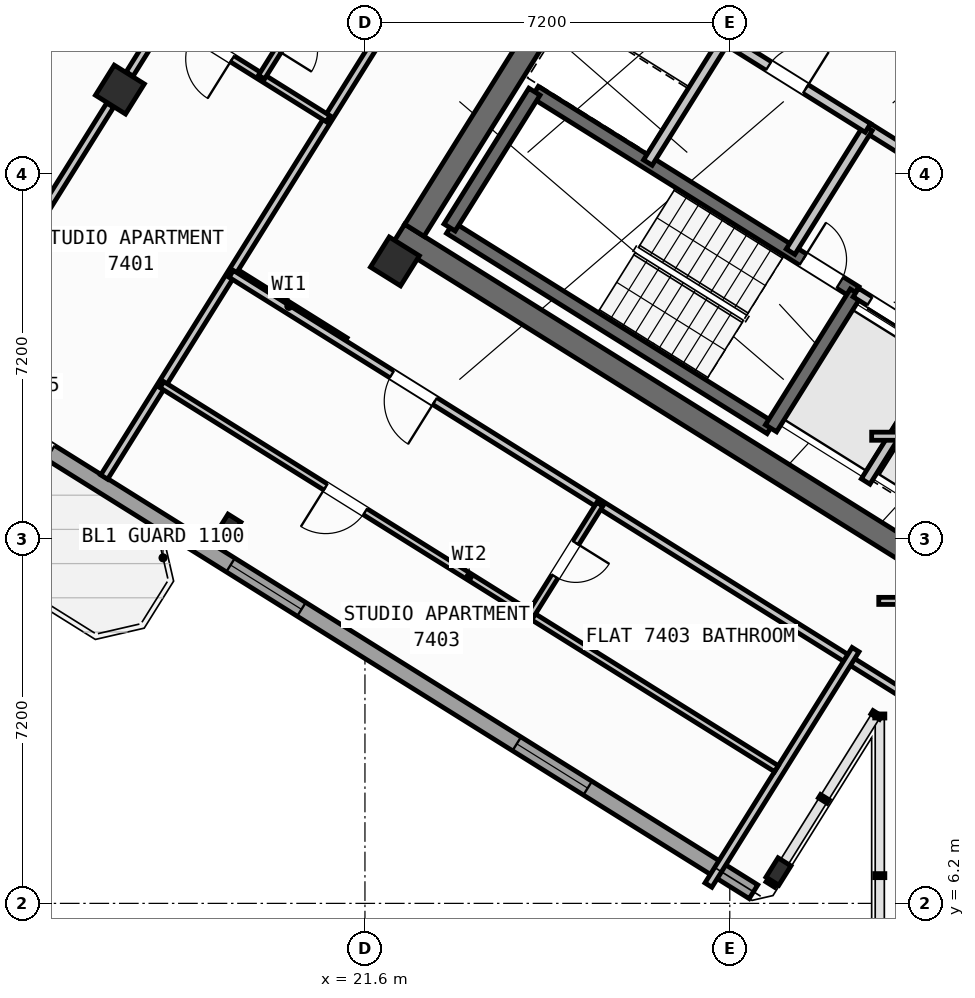
"""IFC4 building model, lengths in metres.
Left out: names, types, materials, properties, quantities, classifications, styles, units other than length and angle.
Written with IfcOpenShell. Run it as: python <this file> out.ifc"""

import sys

from ifc_helpers import new_model, si_unit, direction, frame, frame_2d, origin, origin_2d, place, context, subcontext, project, spatial, rectangle, hollow_rectangle, i_section, extrude, source, transform, mapped, element, fill, save


model = new_model("IFC4")
c1 = context("Model", 3, precision=1e-05, world=origin(), true_north=direction((0.0, 1.0)))
c2 = subcontext(c1, "Body", "Model", "MODEL_VIEW")
j1 = project(units=[si_unit("LENGTHUNIT", "METRE"), si_unit("PLANEANGLEUNIT", "RADIAN")], contexts=[c1])
p1 = place(None, origin())
s1 = spatial("IfcSite", under=j1, at=p1, CompositionType="ELEMENT")
p2 = place(p1, origin())
s2 = spatial("IfcBuilding", under=s1, at=p2, CompositionType="ELEMENT")
p3 = place(p2, frame((0.0, 0.0, 291.6)))
s3 = spatial("IfcBuildingStorey", under=s2, at=p3, CompositionType="ELEMENT", Elevation=291.6)
p4 = place(p3, frame((33.324, 12.503, 0.0), z_axis=(0.0, 0.0, 1.0), x_axis=(-0.848043529849, 0.529926571782, 0.0)))
e1 = element("IfcWall", 1, at=p4, inside=s3, PredefinedType="SHEAR", context=c2, shape_type="SweptSolid", body=[
    extrude(rectangle(XDim=13.04, YDim=0.45, at=frame_2d((6.52, 0.0))), origin(), (0.0, 0.0, 1.0), 3.35),
])
p5 = place(p3, frame((26.007, 24.976, 0.0), z_axis=(0.0, 0.0, 1.0), x_axis=(-0.529931155655, -0.848040665456, 0.0)))
e2 = element("IfcWall", 2, at=p5, inside=s3, PredefinedType="SHEAR", context=c2, shape_type="SweptSolid", body=[
    extrude(rectangle(XDim=6.475, YDim=0.45, at=frame_2d((3.238, 0.0))), origin(), (0.0, 0.0, 1.0), 3.35),
])
m1 = source(origin(), c2, "Body", "SweptSolid", [
    extrude(i_section(OverallWidth=0.3, OverallDepth=0.45, WebThickness=0.014, FlangeThickness=0.026, at=origin_2d()), origin(), (0.0, 0.0, 1.0), 3.6),
])
p6 = place(p3, frame((29.761, 6.829, 0.0), z_axis=(0.0, 0.0, 1.0), x_axis=(-0.848048096156, 0.529919264233, 0.0)))
e3 = element("IfcColumn", 3, at=p6, inside=s3, PredefinedType="COLUMN", context=c2, shape_type="MappedRepresentation", body=[
    mapped(m1, transform((0.0, 0.0, 0.0), scale=1.0)),
])
m2 = source(origin(), c2, "Body", "SweptSolid", [
    extrude(hollow_rectangle(XDim=0.7, YDim=0.7, WallThickness=0.028, at=origin_2d()), origin(), (0.0, 0.0, 1.0), 3.6),
])
p7 = place(p3, frame((22.191, 18.87, 0.0), z_axis=(0.0, 0.0, 1.0), x_axis=(-0.848048096156, 0.529919264233, 0.0)))
e4 = element("IfcColumn", 4, at=p7, inside=s3, PredefinedType="COLUMN", context=c2, shape_type="MappedRepresentation", body=[
    mapped(m2, transform((0.0, 0.0, 0.0), scale=1.0)),
])
p8 = place(p3, frame((18.906, 13.612, 0.0), z_axis=(0.0, 0.0, 1.0), x_axis=(-0.848048096156, 0.529919264233, 0.0)))
e5 = element("IfcColumn", 5, at=p8, inside=s3, PredefinedType="COLUMN", context=c2, shape_type="MappedRepresentation", body=[
    mapped(m1, transform((0.0, 0.0, 0.0), scale=1.0)),
])
p9 = place(p3, frame((16.764, 22.261, 0.0), z_axis=(0.0, 0.0, 1.0), x_axis=(-0.848048096156, 0.529919264233, 0.0)))
e6 = element("IfcColumn", 6, at=p9, inside=s3, PredefinedType="COLUMN", context=c2, shape_type="MappedRepresentation", body=[
    mapped(m2, transform((0.0, 0.0, 0.0), scale=1.0)),
])
p10 = place(p3, frame((29.268, 6.429, 0.0), z_axis=(0.0, 0.0, 1.0), x_axis=(-0.848048398186, 0.529918780885, 0.0)))
e7 = element("IfcWall", 7, at=p10, inside=s3, PredefinedType="STANDARD", context=c2, shape_type="SweptSolid", body=[
    extrude(rectangle(XDim=25.188, YDim=0.32, at=frame_2d((12.594, 0.0))), origin(), (0.0, 0.0, 1.0), 3.35),
])
p11 = place(p10, frame((16.362, 0.0, 0.0)))
e8 = element("IfcOpeningElement", 8, at=p11, cuts=e7, PredefinedType="OPENING", context=c2, shape_type="SweptSolid", body=[
    extrude(rectangle(XDim=1.2, YDim=2.15, at=frame_2d((0.6, 1.075))), frame((0.0, 0.17, 0.0), z_axis=(0.0, -1.0, 0.0), x_axis=(1.0, 0.0, 0.0)), (0.0, 0.0, 1.0), 0.34),
])
p12 = place(p10, frame((3.859, 0.0, 0.9)))
e9 = element("IfcOpeningElement", 9, at=p12, cuts=e7, PredefinedType="OPENING", context=c2, shape_type="SweptSolid", body=[
    extrude(rectangle(XDim=1.65, YDim=1.45, at=frame_2d((0.825, 0.725))), frame((0.0, 0.17, 0.0), z_axis=(0.0, -1.0, 0.0), x_axis=(1.0, 0.0, 0.0)), (0.0, 0.0, 1.0), 0.34),
])
p13 = place(p10, frame((10.519, 0.0, 0.9)))
e10 = element("IfcOpeningElement", 10, at=p13, cuts=e7, PredefinedType="OPENING", context=c2, shape_type="SweptSolid", body=[
    extrude(rectangle(XDim=1.65, YDim=1.45, at=frame_2d((0.825, 0.725))), frame((0.0, 0.17, 0.0), z_axis=(0.0, -1.0, 0.0), x_axis=(1.0, 0.0, 0.0)), (0.0, 0.0, 1.0), 0.34),
])
p14 = place(p10, frame((21.156, 0.0, 0.95)))
e11 = element("IfcOpeningElement", 11, at=p14, cuts=e7, PredefinedType="OPENING", context=c2, shape_type="SweptSolid", body=[
    extrude(rectangle(XDim=1.95, YDim=1.35, at=frame_2d((0.975, 0.675))), frame((0.0, 0.17, 0.0), z_axis=(0.0, -1.0, 0.0), x_axis=(1.0, 0.0, 0.0)), (0.0, 0.0, 1.0), 0.34),
])
p15 = place(p3, frame((7.842, 20.061, 0.0), z_axis=(0.0, 0.0, 1.0), x_axis=(0.529915577903, 0.84805039962, 0.0)))
e12 = element("IfcWall", 12, at=p15, inside=s3, PredefinedType="STANDARD", context=c2, shape_type="SweptSolid", body=[
    extrude(rectangle(XDim=21.587, YDim=0.32, at=frame_2d((10.794, 0.0))), origin(), (0.0, 0.0, 1.0), 2.875),
])
p16 = place(p15, frame((1.368, 0.0, 0.9)))
e13 = element("IfcOpeningElement", 13, at=p16, cuts=e12, PredefinedType="OPENING", context=c2, shape_type="SweptSolid", body=[
    extrude(rectangle(XDim=1.65, YDim=1.45, at=frame_2d((0.825, 0.725))), frame((0.0, 0.17, 0.0), z_axis=(0.0, -1.0, 0.0), x_axis=(1.0, 0.0, 0.0)), (0.0, 0.0, 1.0), 0.34),
])
p17 = place(p15, frame((4.71, 0.0, 1.0)))
e14 = element("IfcOpeningElement", 14, at=p17, cuts=e12, PredefinedType="OPENING", context=c2, shape_type="SweptSolid", body=[
    extrude(rectangle(XDim=0.9, YDim=1.25, at=frame_2d((0.45, 0.625))), frame((0.0, 0.17, 0.0), z_axis=(0.0, -1.0, 0.0), x_axis=(1.0, 0.0, 0.0)), (0.0, 0.0, 1.0), 0.34),
])
p18 = place(p15, frame((7.554, 0.0, 0.95)))
e15 = element("IfcOpeningElement", 15, at=p18, cuts=e12, PredefinedType="OPENING", context=c2, shape_type="SweptSolid", body=[
    extrude(rectangle(XDim=1.95, YDim=1.35, at=frame_2d((0.975, 0.675))), frame((0.0, 0.17, 0.0), z_axis=(0.0, -1.0, 0.0), x_axis=(1.0, 0.0, 0.0)), (0.0, 0.0, 1.0), 0.34),
])
p19 = place(p15, frame((16.744, 0.0, 1.0)))
e16 = element("IfcOpeningElement", 16, at=p19, cuts=e12, PredefinedType="OPENING", context=c2, shape_type="SweptSolid", body=[
    extrude(rectangle(XDim=0.9, YDim=1.25, at=frame_2d((0.45, 0.625))), frame((0.0, 0.17, 0.0), z_axis=(0.0, -1.0, 0.0), x_axis=(1.0, 0.0, 0.0)), (0.0, 0.0, 1.0), 0.34),
])
p20 = place(p15, frame((18.944, 0.0, 1.0)))
e17 = element("IfcOpeningElement", 17, at=p20, cuts=e12, PredefinedType="OPENING", context=c2, shape_type="SweptSolid", body=[
    extrude(rectangle(XDim=0.9, YDim=1.25, at=frame_2d((0.45, 0.625))), frame((0.0, 0.17, 0.0), z_axis=(0.0, -1.0, 0.0), x_axis=(1.0, 0.0, 0.0)), (0.0, 0.0, 1.0), 0.34),
])
p21 = place(p3, frame((29.605, 15.581, 0.0), z_axis=(0.0, 0.0, 1.0), x_axis=(-0.848036911448, 0.529937163087, 0.0)))
e18 = element("IfcWall", 18, at=p21, inside=s3, PredefinedType="SHEAR", context=c2, shape_type="SweptSolid", body=[
    extrude(rectangle(XDim=7.46, YDim=0.26, at=frame_2d((3.73, 0.0))), origin(), (0.0, 0.0, 1.0), 3.35),
])
p22 = place(p3, frame((31.28, 18.261, 0.0), z_axis=(0.0, 0.0, 1.0), x_axis=(-0.848051618787, 0.529913626805, 0.0)))
e19 = element("IfcWall", 19, at=p22, inside=s3, PredefinedType="SHEAR", context=c2, shape_type="SweptSolid", body=[
    extrude(rectangle(XDim=7.46, YDim=0.26, at=frame_2d((3.73, 0.0))), origin(), (0.0, 0.0, 1.0), 3.35),
])
p23 = place(p22, frame((0.36, 0.0, 0.0)))
e20 = element("IfcOpeningElement", 20, at=p23, cuts=e19, PredefinedType="OPENING", context=c2, shape_type="SweptSolid", body=[
    extrude(rectangle(XDim=0.86, YDim=2.05, at=frame_2d((0.43, 1.025))), frame((0.0, 0.14, 0.0), z_axis=(0.0, -1.0, 0.0), x_axis=(1.0, 0.0, 0.0)), (0.0, 0.0, 1.0), 0.28),
])
p24 = place(p3, frame((31.288, 18.256, 0.0), z_axis=(0.0, 0.0, 1.0), x_axis=(-0.529943379326, -0.848033026897, 0.0)))
e21 = element("IfcWall", 21, at=p24, inside=s3, PredefinedType="SHEAR", context=c2, shape_type="SweptSolid", body=[
    extrude(rectangle(XDim=3.16, YDim=0.26, at=frame_2d((1.58, 0.0))), origin(), (0.0, 0.0, 1.0), 3.35),
])
p25 = place(p3, frame((24.945, 22.22, 0.0), z_axis=(0.0, 0.0, 1.0), x_axis=(-0.529908658664, -0.84805472316, 0.0)))
e22 = element("IfcWall", 22, at=p25, inside=s3, PredefinedType="SHEAR", context=c2, shape_type="SweptSolid", body=[
    extrude(rectangle(XDim=3.16, YDim=0.26, at=frame_2d((1.58, 0.0))), origin(), (0.0, 0.0, 1.0), 3.35),
])
p26 = place(p3, frame((38.046, 21.108, 0.0), z_axis=(0.0, 0.0, 1.0), x_axis=(-0.848054434086, 0.529909121291, 0.0)))
e23 = element("IfcWall", 23, at=p26, inside=s3, PredefinedType="SHEAR", context=c2, shape_type="SweptSolid", body=[
    extrude(rectangle(XDim=7.33, YDim=0.26, at=frame_2d((3.665, 0.0))), origin(), (0.0, 0.0, 1.0), 3.35),
])
p27 = place(p26, frame((0.22, 0.0, 0.0)))
e24 = element("IfcOpeningElement", 24, at=p27, cuts=e23, PredefinedType="OPENING", context=c2, shape_type="SweptSolid", body=[
    extrude(rectangle(XDim=1.1, YDim=2.1, at=frame_2d((0.55, 1.05))), frame((0.0, 0.14, 0.0), z_axis=(0.0, -1.0, 0.0), x_axis=(1.0, 0.0, 0.0)), (0.0, 0.0, 1.0), 0.28),
])
p28 = place(p3, frame((34.933, 15.978, 0.0), z_axis=(0.0, 0.0, 1.0), x_axis=(-0.848055739377, 0.529907032327, 0.0)))
e25 = element("IfcWall", 25, at=p28, inside=s3, PredefinedType="STANDARD", context=c2, shape_type="SweptSolid", body=[
    extrude(rectangle(XDim=4.298, YDim=0.2, at=frame_2d((2.149, 0.0))), origin(), (0.0, 0.0, 1.0), 3.34),
])
p29 = place(p28, frame((0.448, 0.0, 0.0)))
e26 = element("IfcOpeningElement", 26, at=p29, cuts=e25, PredefinedType="OPENING", context=c2, shape_type="SweptSolid", body=[
    extrude(rectangle(XDim=1.3, YDim=2.2, at=frame_2d((0.65, 1.1))), frame((0.0, 0.11, 0.0), z_axis=(0.0, -1.0, 0.0), x_axis=(1.0, 0.0, 0.0)), (0.0, 0.0, 1.0), 0.22),
])
p30 = place(p28, frame((2.523, 0.0, 0.0)))
e27 = element("IfcOpeningElement", 27, at=p30, cuts=e25, PredefinedType="OPENING", context=c2, shape_type="SweptSolid", body=[
    extrude(rectangle(XDim=1.45, YDim=2.25, at=frame_2d((0.725, 1.125))), frame((0.0, 0.11, 0.0), z_axis=(0.0, -1.0, 0.0), x_axis=(1.0, 0.0, 0.0)), (0.0, 0.0, 1.0), 0.22),
])
p31 = place(p3, frame((36.459, 18.421, 0.0), z_axis=(0.0, 0.0, 1.0), x_axis=(-0.848059591691, 0.529900867089, 0.0)))
e28 = element("IfcWall", 28, at=p31, inside=s3, PredefinedType="STANDARD", context=c2, shape_type="SweptSolid", body=[
    extrude(rectangle(XDim=5.818, YDim=0.2, at=frame_2d((2.909, 0.0))), origin(), (0.0, 0.0, 1.0), 3.34),
])
p32 = place(p31, frame((2.598, 0.0, 0.0)))
e29 = element("IfcOpeningElement", 29, at=p32, cuts=e28, PredefinedType="OPENING", context=c2, shape_type="SweptSolid", body=[
    extrude(rectangle(XDim=1.15, YDim=2.1, at=frame_2d((0.575, 1.05))), frame((0.0, 0.11, 0.0), z_axis=(0.0, -1.0, 0.0), x_axis=(1.0, 0.0, 0.0)), (0.0, 0.0, 1.0), 0.22),
])
p33 = place(p3, frame((33.029, 17.003, 0.0), z_axis=(0.0, 0.0, 1.0), x_axis=(-0.529916267533, -0.848049968695, 0.0)))
e30 = element("IfcWall", 30, at=p33, inside=s3, PredefinedType="STANDARD", context=c2, shape_type="SweptSolid", body=[
    extrude(rectangle(XDim=2.92, YDim=0.2, at=frame_2d((1.46, 0.0))), origin(), (0.0, 0.0, 1.0), 3.34),
])
for number, where, z_axis, x_axis in (
    (31, (31.525, 21.504, 0.0), (0.0, 0.0, 1.0), (-0.53, -0.848, 0.0)),
    (32, (28.71, 23.263, 0.0), (0.0, 0.0, 1.0), (-0.53, -0.848, 0.0)),
):
    element("IfcWall", number, at=place(p3, frame(where, z_axis=z_axis, x_axis=x_axis)), inside=s3, PredefinedType="STANDARD", context=c2, shape_type="SweptSolid", body=[
        extrude(rectangle(XDim=2.88, YDim=0.2, at=frame_2d((1.44, 0.0))), origin(), (0.0, 0.0, 1.0), 3.34),
    ])
p34 = place(p3, frame((31.525, 21.504, 0.0), z_axis=(0.0, 0.0, 1.0), x_axis=(-0.848042066329, 0.529928913853, 0.0)))
e33 = element("IfcWall", 33, at=p34, inside=s3, PredefinedType="STANDARD", context=c2, shape_type="SweptSolid", body=[
    extrude(rectangle(XDim=6.268, YDim=0.2, at=frame_2d((3.134, 0.0))), origin(), (0.0, 0.0, 1.0), 3.34),
])
p35 = place(p34, frame((4.4, 0.0, 0.0)))
e34 = element("IfcOpeningElement", 34, at=p35, cuts=e33, PredefinedType="OPENING", context=c2, shape_type="SweptSolid", body=[
    extrude(rectangle(XDim=0.86, YDim=2.05, at=frame_2d((0.43, 1.025))), frame((0.0, 0.11, 0.0), z_axis=(0.0, -1.0, 0.0), x_axis=(1.0, 0.0, 0.0)), (0.0, 0.0, 1.0), 0.22),
])
p36 = place(p34, frame((1.45, 0.0, 0.0)))
e35 = element("IfcOpeningElement", 35, at=p36, cuts=e33, PredefinedType="OPENING", context=c2, shape_type="SweptSolid", body=[
    extrude(rectangle(XDim=0.86, YDim=2.05, at=frame_2d((0.43, 1.025))), frame((0.0, 0.11, 0.0), z_axis=(0.0, -1.0, 0.0), x_axis=(1.0, 0.0, 0.0)), (0.0, 0.0, 1.0), 0.22),
])
p37 = place(p3, frame((21.206, 17.292, 0.0), z_axis=(0.0, 0.0, 1.0), x_axis=(-0.848050851465, 0.529914854792, 0.0)))
e36 = element("IfcWall", 36, at=p37, inside=s3, PredefinedType="PARTITIONING", context=c2, shape_type="SweptSolid", body=[
    extrude(rectangle(XDim=2.61, YDim=0.16, at=frame_2d((1.305, 0.0))), origin(), (0.0, 0.0, 1.0), 3.34),
])
p38 = place(p3, frame((21.938, 23.391, 0.0), z_axis=(0.0, 0.0, 1.0), x_axis=(-0.529924725692, -0.848044683434, 0.0)))
e37 = element("IfcWall", 37, at=p38, inside=s3, PredefinedType="PARTITIONING", context=c2, shape_type="SweptSolid", body=[
    extrude(rectangle(XDim=10.35, YDim=0.16, at=frame_2d((5.175, 0.0))), origin(), (0.0, 0.0, 1.0), 3.34),
])
p39 = place(p3, frame((18.724, 25.399, 0.0), z_axis=(0.0, 0.0, 1.0), x_axis=(-0.529952920244, -0.848027064618, 0.0)))
e38 = element("IfcWall", 38, at=p39, inside=s3, PredefinedType="PARTITIONING", context=c2, shape_type="SweptSolid", body=[
    extrude(rectangle(XDim=3.338, YDim=0.16, at=frame_2d((1.669, 0.0))), origin(), (0.0, 0.0, 1.0), 2.875),
])
p40 = place(p3, frame((16.572, 21.954, 0.0), z_axis=(0.0, 0.0, 1.0), x_axis=(-0.529904903214, -0.848057069748, 0.0)))
e39 = element("IfcWall", 39, at=p40, inside=s3, PredefinedType="PARTITIONING", context=c2, shape_type="SweptSolid", body=[
    extrude(rectangle(XDim=5.601, YDim=0.16, at=frame_2d((2.801, 0.0))), origin(), (0.0, 0.0, 1.0), 2.875),
])
p41 = place(p3, frame((20.873, 21.686, 0.0), z_axis=(0.0, 0.0, 1.0), x_axis=(-0.84803087207, 0.529946827537, 0.0)))
e40 = element("IfcWall", 40, at=p41, inside=s3, PredefinedType="PLUMBINGWALL", context=c2, shape_type="SweptSolid", body=[
    extrude(rectangle(XDim=3.79, YDim=0.14, at=frame_2d((1.895, 0.0))), origin(), (0.0, 0.0, 1.0), 3.34),
])
p42 = place(p41, frame((2.23, 0.0, 0.0)))
e41 = element("IfcOpeningElement", 41, at=p42, cuts=e40, PredefinedType="OPENING", context=c2, shape_type="SweptSolid", body=[
    extrude(rectangle(XDim=0.92, YDim=2.08, at=frame_2d((0.46, 1.04))), frame((0.0, 0.08, 0.0), z_axis=(0.0, -1.0, 0.0), x_axis=(1.0, 0.0, 0.0)), (0.0, 0.0, 1.0), 0.16),
])
p43 = place(p3, frame((20.624, 24.212, 0.0), z_axis=(0.0, 0.0, 1.0), x_axis=(-0.529933431478, -0.848039243315, 0.0)))
e42 = element("IfcWall", 42, at=p43, inside=s3, PredefinedType="PLUMBINGWALL", context=c2, shape_type="SweptSolid", body=[
    extrude(rectangle(XDim=2.01, YDim=0.14, at=frame_2d((1.005, 0.0))), origin(), (0.0, 0.0, 1.0), 3.025),
])
p44 = place(p43, frame((0.615, 0.0, 0.0)))
e43 = element("IfcOpeningElement", 43, at=p44, cuts=e42, PredefinedType="OPENING", context=c2, shape_type="SweptSolid", body=[
    extrude(rectangle(XDim=0.78, YDim=2.05, at=frame_2d((0.39, 1.025))), frame((0.0, 0.08, 0.0), z_axis=(0.0, -1.0, 0.0), x_axis=(1.0, 0.0, 0.0)), (0.0, 0.0, 1.0), 0.16),
])
p45 = place(p3, frame((32.164, 10.374, 0.0), z_axis=(0.0, 0.0, 1.0), x_axis=(-0.848044107957, 0.529925646633, 0.0)))
e44 = element("IfcWall", 44, at=p45, inside=s3, PredefinedType="PARTITIONING", context=c2, shape_type="SweptSolid", body=[
    extrude(rectangle(XDim=15.57, YDim=0.16, at=frame_2d((7.785, 0.0))), origin(), (0.0, 0.0, 1.0), 3.34),
])
p46 = place(p45, frame((10.83, 0.0, 0.0)))
e45 = element("IfcOpeningElement", 45, at=p46, cuts=e44, PredefinedType="OPENING", context=c2, shape_type="SweptSolid", body=[
    extrude(rectangle(XDim=1.0, YDim=2.1, at=frame_2d((0.5, 1.05))), frame((0.0, 0.09, 0.0), z_axis=(0.0, -1.0, 0.0), x_axis=(1.0, 0.0, 0.0)), (0.0, 0.0, 1.0), 0.18),
])
p47 = place(p3, frame((31.282, 11.208, 0.0), z_axis=(0.0, 0.0, 1.0), x_axis=(-0.529938869374, -0.84803584519, 0.0)))
e46 = element("IfcWall", 46, at=p47, inside=s3, PredefinedType="PARTITIONING", context=c2, shape_type="SweptSolid", body=[
    extrude(rectangle(XDim=5.48, YDim=0.16, at=frame_2d((2.74, 0.0))), origin(), (0.0, 0.0, 1.0), 3.34),
])
p48 = place(p3, frame((29.72, 8.859, 0.0), z_axis=(0.0, 0.0, 1.0), x_axis=(-0.848049134363, 0.529917602752, 0.0)))
e47 = element("IfcWall", 47, at=p48, inside=s3, PredefinedType="PLUMBINGWALL", context=c2, shape_type="SweptSolid", body=[
    extrude(rectangle(XDim=14.3, YDim=0.14, at=frame_2d((7.15, 0.0))), origin(), (0.0, 0.0, 1.0), 3.34),
])
p49 = place(p48, frame((9.57, 0.0, 0.0)))
e48 = element("IfcOpeningElement", 48, at=p49, cuts=e47, PredefinedType="OPENING", context=c2, shape_type="SweptSolid", body=[
    extrude(rectangle(XDim=0.92, YDim=2.08, at=frame_2d((0.46, 1.04))), frame((0.0, 0.08, 0.0), z_axis=(0.0, -1.0, 0.0), x_axis=(1.0, 0.0, 0.0)), (0.0, 0.0, 1.0), 0.16),
])
p50 = place(p3, frame((26.237, 14.078, 0.0), z_axis=(0.0, 0.0, 1.0), x_axis=(-0.52995640672, -0.848024885824, 0.0)))
e49 = element("IfcWall", 49, at=p50, inside=s3, PredefinedType="PLUMBINGWALL", context=c2, shape_type="SweptSolid", body=[
    extrude(rectangle(XDim=2.58, YDim=0.14, at=frame_2d((1.29, 0.0))), origin(), (0.0, 0.0, 1.0), 3.34),
])
p51 = place(p50, frame((0.9, 0.0, 0.0)))
e50 = element("IfcOpeningElement", 50, at=p51, cuts=e49, PredefinedType="OPENING", context=c2, shape_type="SweptSolid", body=[
    extrude(rectangle(XDim=0.78, YDim=2.05, at=frame_2d((0.39, 1.025))), frame((0.0, 0.08, 0.0), z_axis=(0.0, -1.0, 0.0), x_axis=(1.0, 0.0, 0.0)), (0.0, 0.0, 1.0), 0.16),
])
p52 = place(p3, frame((31.6, 15.42, 0.0), z_axis=(0.0, 0.0, 1.0), x_axis=(1.0, 0.0, 0.0)))
e51 = element("IfcWall", 51, at=p52, inside=s3, PredefinedType="PARTITIONING", context=c2, shape_type="SweptSolid", body=[
    extrude(rectangle(XDim=2.984, YDim=0.16, at=frame_2d((1.492, 0.0))), origin(), (0.0, 0.0, 1.0), 3.34),
])
p53 = place(p3, frame((31.74, 12.17, 0.0), z_axis=(0.0, 0.0, 1.0), x_axis=(1.0, 0.0, 0.0)))
e52 = element("IfcWall", 52, at=p53, inside=s3, PredefinedType="PLUMBINGWALL", context=c2, shape_type="SweptSolid", body=[
    extrude(rectangle(XDim=0.931, YDim=0.14, at=frame_2d((0.466, 0.0))), origin(), (0.0, 0.0, 1.0), 3.34),
])
m3 = source(origin(), c2, "Body", "SweptSolid", [
    extrude(rectangle(XDim=1.65, YDim=1.45, at=frame_2d((0.825, 0.725))), frame((0.0, 0.03, 0.0), z_axis=(0.0, -1.0, 0.0), x_axis=(1.0, 0.0, 0.0)), (0.0, 0.0, 1.0), 0.06),
])
p54 = place(p12, origin())
e53 = element("IfcWindow", 53, at=p54, inside=s3, PartitioningType="SINGLE_PANEL", PredefinedType="WINDOW", context=c2, shape_type="MappedRepresentation", body=[
    mapped(m3, transform((0.0, 0.0, 0.0), scale=1.0)),
])
fill(e9, e53)
p55 = place(p13, origin())
e54 = element("IfcWindow", 54, at=p55, inside=s3, PartitioningType="SINGLE_PANEL", PredefinedType="WINDOW", context=c2, shape_type="MappedRepresentation", body=[
    mapped(m3, transform((0.0, 0.0, 0.0), scale=1.0)),
])
fill(e10, e54)
m4 = source(origin(), c2, "Body", "SweptSolid", [
    extrude(rectangle(XDim=0.86, YDim=2.05, at=frame_2d((0.43, 1.025))), frame((0.0, 0.025, 0.0), z_axis=(0.0, -1.0, 0.0), x_axis=(1.0, 0.0, 0.0)), (0.0, 0.0, 1.0), 0.05),
])
p56 = place(p23, frame((0.86, 0.0, 0.0), z_axis=(0.0, 0.0, 1.0), x_axis=(-1.0, 0.0, 0.0)))
e55 = element("IfcDoor", 55, at=p56, inside=s3, OperationType="SINGLE_SWING_LEFT", PredefinedType="DOOR", context=c2, shape_type="MappedRepresentation", body=[
    mapped(m4, transform((0.0, 0.0, 0.0), scale=1.0)),
])
fill(e20, e55)
m5 = source(origin(), c2, "Body", "SweptSolid", [
    extrude(rectangle(XDim=1.45, YDim=2.25, at=frame_2d((0.725, 1.125))), frame((0.0, 0.025, 0.0), z_axis=(0.0, -1.0, 0.0), x_axis=(1.0, 0.0, 0.0)), (0.0, 0.0, 1.0), 0.05),
])
p57 = place(p30, origin())
e56 = element("IfcDoor", 56, at=p57, inside=s3, OperationType="DOUBLE_DOOR_SLIDING", PredefinedType="DOOR", context=c2, shape_type="MappedRepresentation", body=[
    mapped(m5, transform((0.0, 0.0, 0.0), scale=1.0)),
])
fill(e27, e56)
p58 = place(p36, frame((0.86, 0.0, 0.0), z_axis=(0.0, 0.0, 1.0), x_axis=(-1.0, 0.0, 0.0)))
e57 = element("IfcDoor", 57, at=p58, inside=s3, OperationType="SINGLE_SWING_RIGHT", PredefinedType="DOOR", context=c2, shape_type="MappedRepresentation", body=[
    mapped(m4, transform((0.0, 0.0, 0.0), scale=1.0)),
])
fill(e35, e57)
m6 = source(origin(), c2, "Body", "SweptSolid", [
    extrude(rectangle(XDim=0.92, YDim=2.08, at=frame_2d((0.46, 1.04))), frame((0.0, 0.025, 0.0), z_axis=(0.0, -1.0, 0.0), x_axis=(1.0, 0.0, 0.0)), (0.0, 0.0, 1.0), 0.05),
])
p59 = place(p42, origin())
e58 = element("IfcDoor", 58, at=p59, inside=s3, OperationType="SINGLE_SWING_LEFT", PredefinedType="DOOR", context=c2, shape_type="MappedRepresentation", body=[
    mapped(m6, transform((0.0, 0.0, 0.0), scale=1.0)),
])
fill(e41, e58)
m7 = source(origin(), c2, "Body", "SweptSolid", [
    extrude(rectangle(XDim=1.0, YDim=2.1, at=frame_2d((0.5, 1.05))), frame((0.0, 0.025, 0.0), z_axis=(0.0, -1.0, 0.0), x_axis=(1.0, 0.0, 0.0)), (0.0, 0.0, 1.0), 0.05),
])
p60 = place(p46, origin())
e59 = element("IfcDoor", 59, at=p60, inside=s3, OperationType="SINGLE_SWING_LEFT", PredefinedType="DOOR", context=c2, shape_type="MappedRepresentation", body=[
    mapped(m7, transform((0.0, 0.0, 0.0), scale=1.0)),
])
fill(e45, e59)
p61 = place(p49, origin())
e60 = element("IfcDoor", 60, at=p61, inside=s3, OperationType="SINGLE_SWING_RIGHT", PredefinedType="DOOR", context=c2, shape_type="MappedRepresentation", body=[
    mapped(m6, transform((0.0, 0.0, 0.0), scale=1.0)),
])
fill(e48, e60)
m8 = source(origin(), c2, "Body", "SweptSolid", [
    extrude(rectangle(XDim=0.78, YDim=2.05, at=frame_2d((0.39, 1.025))), frame((0.0, 0.025, 0.0), z_axis=(0.0, -1.0, 0.0), x_axis=(1.0, 0.0, 0.0)), (0.0, 0.0, 1.0), 0.05),
])
p62 = place(p51, origin())
e61 = element("IfcDoor", 61, at=p62, inside=s3, OperationType="SINGLE_SWING_LEFT", PredefinedType="DOOR", context=c2, shape_type="MappedRepresentation", body=[
    mapped(m8, transform((0.0, 0.0, 0.0), scale=1.0)),
])
fill(e50, e61)
save(model, sys.argv[1])
